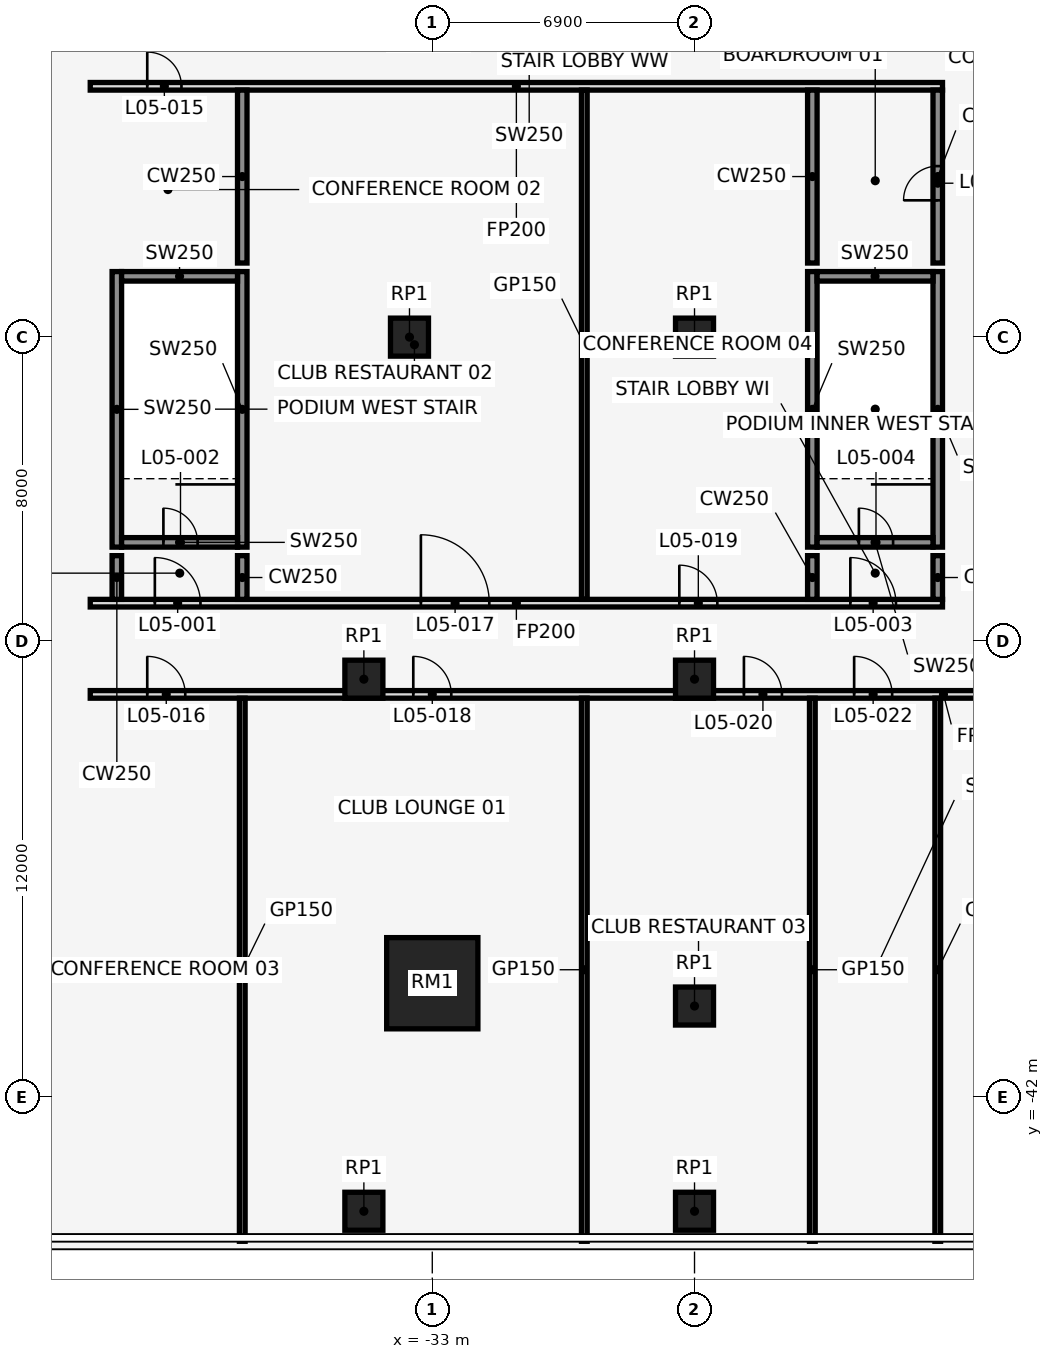
"""IFC4 building model, lengths in metres.
Left out: names, types, materials, properties, quantities, classifications, styles, units other than length and angle.
Written with IfcOpenShell. Run it as: python <this file> out.ifc"""

import sys

from ifc_helpers import new_model, si_unit, direction, frame, frame_2d, origin, origin_2d, place, context, subcontext, project, spatial, rectangle, extrude, element, fill, save


model = new_model("IFC4")
c1 = context("Model", 3, precision=1e-05, world=origin(), true_north=direction((0.0, 1.0)))
c2 = subcontext(c1, "Body", "Model", "MODEL_VIEW")
j1 = project(units=[si_unit("LENGTHUNIT", "METRE"), si_unit("PLANEANGLEUNIT", "RADIAN")], contexts=[c1])
p1 = place(None, origin())
s1 = spatial("IfcSite", under=j1, at=p1, CompositionType="ELEMENT")
p2 = place(p1, origin())
s2 = spatial("IfcBuilding", under=s1, at=p2, CompositionType="ELEMENT")
p3 = place(p2, frame((0.0, 0.0, 30.0)))
s3 = spatial("IfcBuildingStorey", under=s2, at=p3, CompositionType="ELEMENT", Elevation=30.0)
p4 = place(p3, frame((-33.0, -39.0, 0.0), z_axis=(0.0, 0.0, 1.0), x_axis=(1.0, 0.0, 0.0)))
e1 = element("IfcColumn", 1, at=p4, inside=s3, PredefinedType="COLUMN", context=c2, shape_type="SweptSolid", body=[
    extrude(rectangle(XDim=2.4, YDim=2.4, at=origin_2d()), origin(), (0.0, 0.0, 1.0), 5.0),
])
for number, where, z_axis, x_axis in (
    (2, (-26.1, -39.6, 0.0), (0.0, 0.0, 1.0), (1.0, 0.0, 0.0)),
    (3, (-33.6, -22.0, 0.0), (0.0, 0.0, 1.0), (1.0, 0.0, 0.0)),
    (4, (-26.1, -22.0, 0.0), (0.0, 0.0, 1.0), (1.0, 0.0, 0.0)),
    (5, (-34.8, -31.0, 0.0), (0.0, 0.0, 1.0), (1.0, 0.0, 0.0)),
    (6, (-34.8, -45.0, 0.0), (0.0, 0.0, 1.0), (1.0, 0.0, 0.0)),
    (7, (-26.1, -31.0, 0.0), (0.0, 0.0, 1.0), (1.0, 0.0, 0.0)),
    (8, (-26.1, -45.0, 0.0), (0.0, 0.0, 1.0), (1.0, 0.0, 0.0)),
):
    element("IfcColumn", number, at=place(p3, frame(where, z_axis=z_axis, x_axis=x_axis)), inside=s3, PredefinedType="COLUMN", context=c2, shape_type="SweptSolid", body=[
        extrude(rectangle(XDim=1.0, YDim=1.0, at=origin_2d()), origin(), (0.0, 0.0, 1.0), 5.0),
    ])
for number, where, z_axis, x_axis in (
    (9, (-41.3, -27.525, 0.0), (0.0, 0.0, 1.0), (0.0, 1.0, 0.0)),
    (10, (-38.0, -27.525, 0.0), (0.0, 0.0, 1.0), (0.0, 1.0, 0.0)),
):
    element("IfcWall", number, at=place(p3, frame(where, z_axis=z_axis, x_axis=x_axis)), inside=s3, PredefinedType="SHEAR", context=c2, shape_type="SweptSolid", body=[
        extrude(rectangle(XDim=7.25, YDim=0.25, at=frame_2d((3.625, 0.0))), origin(), (0.0, 0.0, 1.0), 5.0),
    ])
p5 = place(p3, frame((-41.175, -27.4, 0.0), z_axis=(0.0, 0.0, 1.0), x_axis=(1.0, 0.0, 0.0)))
e11 = element("IfcWall", 11, at=p5, inside=s3, PredefinedType="SHEAR", context=c2, shape_type="SweptSolid", body=[
    extrude(rectangle(XDim=3.05, YDim=0.25, at=frame_2d((1.525, 0.0))), origin(), (0.0, 0.0, 1.0), 5.0),
])
p6 = place(p5, frame((1.1, 0.0, 0.0)))
e12 = element("IfcOpeningElement", 12, at=p6, cuts=e11, PredefinedType="OPENING", context=c2, shape_type="SweptSolid", body=[
    extrude(rectangle(XDim=0.9, YDim=2.1, at=frame_2d((0.45, 1.05))), frame((0.0, 0.137, 0.0), z_axis=(0.0, -1.0, 0.0), x_axis=(1.0, 0.0, 0.0)), (0.0, 0.0, 1.0), 0.274),
])
p7 = place(p3, frame((-41.175, -20.4, 0.0), z_axis=(0.0, 0.0, 1.0), x_axis=(1.0, 0.0, 0.0)))
e13 = element("IfcWall", 13, at=p7, inside=s3, PredefinedType="SHEAR", context=c2, shape_type="SweptSolid", body=[
    extrude(rectangle(XDim=3.05, YDim=0.25, at=frame_2d((1.525, 0.0))), origin(), (0.0, 0.0, 1.0), 5.0),
])
for number, where, z_axis, x_axis in (
    (14, (-23.0, -27.525, 0.0), (0.0, 0.0, 1.0), (0.0, 1.0, 0.0)),
    (15, (-19.7, -27.525, 0.0), (0.0, 0.0, 1.0), (0.0, 1.0, 0.0)),
):
    element("IfcWall", number, at=place(p3, frame(where, z_axis=z_axis, x_axis=x_axis)), inside=s3, PredefinedType="SHEAR", context=c2, shape_type="SweptSolid", body=[
        extrude(rectangle(XDim=7.25, YDim=0.25, at=frame_2d((3.625, 0.0))), origin(), (0.0, 0.0, 1.0), 5.0),
    ])
p8 = place(p3, frame((-22.875, -27.4, 0.0), z_axis=(0.0, 0.0, 1.0), x_axis=(1.0, 0.0, 0.0)))
e16 = element("IfcWall", 16, at=p8, inside=s3, PredefinedType="SHEAR", context=c2, shape_type="SweptSolid", body=[
    extrude(rectangle(XDim=3.05, YDim=0.25, at=frame_2d((1.525, 0.0))), origin(), (0.0, 0.0, 1.0), 5.0),
])
p9 = place(p8, frame((1.1, 0.0, 0.0)))
e17 = element("IfcOpeningElement", 17, at=p9, cuts=e16, PredefinedType="OPENING", context=c2, shape_type="SweptSolid", body=[
    extrude(rectangle(XDim=0.9, YDim=2.1, at=frame_2d((0.45, 1.05))), frame((0.0, 0.137, 0.0), z_axis=(0.0, -1.0, 0.0), x_axis=(1.0, 0.0, 0.0)), (0.0, 0.0, 1.0), 0.274),
])
p10 = place(p3, frame((-22.875, -20.4, 0.0), z_axis=(0.0, 0.0, 1.0), x_axis=(1.0, 0.0, 0.0)))
e18 = element("IfcWall", 18, at=p10, inside=s3, PredefinedType="SHEAR", context=c2, shape_type="SweptSolid", body=[
    extrude(rectangle(XDim=3.05, YDim=0.25, at=frame_2d((1.525, 0.0))), origin(), (0.0, 0.0, 1.0), 5.0),
])
p11 = place(p3, frame((-42.0, -31.4, 0.0), z_axis=(0.0, 0.0, 1.0), x_axis=(1.0, 0.0, 0.0)))
e19 = element("IfcWall", 19, at=p11, inside=s3, PredefinedType="PARTITIONING", context=c2, shape_type="SweptSolid", body=[
    extrude(rectangle(XDim=44.9, YDim=0.2, at=frame_2d((22.45, 0.0))), origin(), (0.0, 0.0, 1.0), 3.74),
])
p12 = place(p11, frame((1.5, 0.0, 0.0)))
e20 = element("IfcOpeningElement", 20, at=p12, cuts=e19, PredefinedType="OPENING", context=c2, shape_type="SweptSolid", body=[
    extrude(rectangle(XDim=1.0, YDim=2.1, at=frame_2d((0.5, 1.05))), frame((0.0, 0.112, 0.0), z_axis=(0.0, -1.0, 0.0), x_axis=(1.0, 0.0, 0.0)), (0.0, 0.0, 1.0), 0.224),
])
p13 = place(p11, frame((8.5, 0.0, 0.0)))
e21 = element("IfcOpeningElement", 21, at=p13, cuts=e19, PredefinedType="OPENING", context=c2, shape_type="SweptSolid", body=[
    extrude(rectangle(XDim=1.0, YDim=2.1, at=frame_2d((0.5, 1.05))), frame((0.0, 0.112, 0.0), z_axis=(0.0, -1.0, 0.0), x_axis=(1.0, 0.0, 0.0)), (0.0, 0.0, 1.0), 0.224),
])
p14 = place(p11, frame((17.2, 0.0, 0.0)))
e22 = element("IfcOpeningElement", 22, at=p14, cuts=e19, PredefinedType="OPENING", context=c2, shape_type="SweptSolid", body=[
    extrude(rectangle(XDim=1.0, YDim=2.1, at=frame_2d((0.5, 1.05))), frame((0.0, 0.112, 0.0), z_axis=(0.0, -1.0, 0.0), x_axis=(1.0, 0.0, 0.0)), (0.0, 0.0, 1.0), 0.224),
])
p15 = place(p11, frame((20.1, 0.0, 0.0)))
e23 = element("IfcOpeningElement", 23, at=p15, cuts=e19, PredefinedType="OPENING", context=c2, shape_type="SweptSolid", body=[
    extrude(rectangle(XDim=1.0, YDim=2.1, at=frame_2d((0.5, 1.05))), frame((0.0, 0.112, 0.0), z_axis=(0.0, -1.0, 0.0), x_axis=(1.0, 0.0, 0.0)), (0.0, 0.0, 1.0), 0.224),
])
p16 = place(p11, frame((28.9, 0.0, 0.0)))
e24 = element("IfcOpeningElement", 24, at=p16, cuts=e19, PredefinedType="OPENING", context=c2, shape_type="SweptSolid", body=[
    extrude(rectangle(XDim=1.0, YDim=2.1, at=frame_2d((0.5, 1.05))), frame((0.0, 0.112, 0.0), z_axis=(0.0, -1.0, 0.0), x_axis=(1.0, 0.0, 0.0)), (0.0, 0.0, 1.0), 0.224),
])
p17 = place(p11, frame((38.6, 0.0, 0.0)))
e25 = element("IfcOpeningElement", 25, at=p17, cuts=e19, PredefinedType="OPENING", context=c2, shape_type="SweptSolid", body=[
    extrude(rectangle(XDim=1.0, YDim=2.1, at=frame_2d((0.5, 1.05))), frame((0.0, 0.112, 0.0), z_axis=(0.0, -1.0, 0.0), x_axis=(1.0, 0.0, 0.0)), (0.0, 0.0, 1.0), 0.224),
])
p18 = place(p3, frame((-42.0, -29.0, 0.0), z_axis=(0.0, 0.0, 1.0), x_axis=(1.0, 0.0, 0.0)))
e26 = element("IfcWall", 26, at=p18, inside=s3, PredefinedType="PARTITIONING", context=c2, shape_type="SweptSolid", body=[
    extrude(rectangle(XDim=22.425, YDim=0.2, at=frame_2d((11.212, 0.0))), origin(), (0.0, 0.0, 1.0), 3.74),
])
p19 = place(p18, frame((1.7, 0.0, 0.0)))
e27 = element("IfcOpeningElement", 27, at=p19, cuts=e26, PredefinedType="OPENING", context=c2, shape_type="SweptSolid", body=[
    extrude(rectangle(XDim=1.2, YDim=2.1, at=frame_2d((0.6, 1.05))), frame((0.0, 0.112, 0.0), z_axis=(0.0, -1.0, 0.0), x_axis=(1.0, 0.0, 0.0)), (0.0, 0.0, 1.0), 0.224),
])
p20 = place(p18, frame((20.0, 0.0, 0.0)))
e28 = element("IfcOpeningElement", 28, at=p20, cuts=e26, PredefinedType="OPENING", context=c2, shape_type="SweptSolid", body=[
    extrude(rectangle(XDim=1.2, YDim=2.1, at=frame_2d((0.6, 1.05))), frame((0.0, 0.112, 0.0), z_axis=(0.0, -1.0, 0.0), x_axis=(1.0, 0.0, 0.0)), (0.0, 0.0, 1.0), 0.224),
])
p21 = place(p18, frame((8.7, 0.0, 0.0)))
e29 = element("IfcOpeningElement", 29, at=p21, cuts=e26, PredefinedType="OPENING", context=c2, shape_type="SweptSolid", body=[
    extrude(rectangle(XDim=1.8, YDim=2.1, at=frame_2d((0.9, 1.05))), frame((0.0, 0.112, 0.0), z_axis=(0.0, -1.0, 0.0), x_axis=(1.0, 0.0, 0.0)), (0.0, 0.0, 1.0), 0.224),
])
p22 = place(p18, frame((15.5, 0.0, 0.0)))
e30 = element("IfcOpeningElement", 30, at=p22, cuts=e26, PredefinedType="OPENING", context=c2, shape_type="SweptSolid", body=[
    extrude(rectangle(XDim=1.0, YDim=2.1, at=frame_2d((0.5, 1.05))), frame((0.0, 0.112, 0.0), z_axis=(0.0, -1.0, 0.0), x_axis=(1.0, 0.0, 0.0)), (0.0, 0.0, 1.0), 0.224),
])
p23 = place(p3, frame((-42.0, -15.4, 0.0), z_axis=(0.0, 0.0, 1.0), x_axis=(1.0, 0.0, 0.0)))
e31 = element("IfcWall", 31, at=p23, inside=s3, PredefinedType="PARTITIONING", context=c2, shape_type="SweptSolid", body=[
    extrude(rectangle(XDim=22.425, YDim=0.2, at=frame_2d((11.212, 0.0))), origin(), (0.0, 0.0, 1.0), 3.74),
])
p24 = place(p23, frame((1.5, 0.0, 0.0)))
e32 = element("IfcOpeningElement", 32, at=p24, cuts=e31, PredefinedType="OPENING", context=c2, shape_type="SweptSolid", body=[
    extrude(rectangle(XDim=0.9, YDim=2.1, at=frame_2d((0.45, 1.05))), frame((0.0, 0.112, 0.0), z_axis=(0.0, -1.0, 0.0), x_axis=(1.0, 0.0, 0.0)), (0.0, 0.0, 1.0), 0.224),
])
p25 = place(p3, frame((-41.3, -28.9, 0.0), z_axis=(0.0, 0.0, 1.0), x_axis=(0.0, 1.0, 0.0)))
e33 = element("IfcWall", 33, at=p25, inside=s3, PredefinedType="SHEAR", context=c2, shape_type="SweptSolid", body=[
    extrude(rectangle(XDim=1.15, YDim=0.25, at=frame_2d((0.575, 0.0))), origin(), (0.0, 0.0, 1.0), 5.0),
])
p26 = place(p3, frame((-38.0, -45.79, 0.0), z_axis=(0.0, 0.0, 1.0), x_axis=(0.0, 1.0, 0.0)))
e34 = element("IfcWall", 34, at=p26, inside=s3, PredefinedType="PARTITIONING", context=c2, shape_type="SweptSolid", body=[
    extrude(rectangle(XDim=14.29, YDim=0.15, at=frame_2d((7.145, 0.0))), origin(), (0.0, 0.0, 1.0), 3.74),
])
p27 = place(p3, frame((-38.0, -28.9, 0.0), z_axis=(0.0, 0.0, 1.0), x_axis=(0.0, 1.0, 0.0)))
e35 = element("IfcWall", 35, at=p27, inside=s3, PredefinedType="SHEAR", context=c2, shape_type="SweptSolid", body=[
    extrude(rectangle(XDim=1.15, YDim=0.25, at=frame_2d((0.575, 0.0))), origin(), (0.0, 0.0, 1.0), 5.0),
])
p28 = place(p3, frame((-38.0, -20.05, 0.0), z_axis=(0.0, 0.0, 1.0), x_axis=(0.0, 1.0, 0.0)))
e36 = element("IfcWall", 36, at=p28, inside=s3, PredefinedType="SHEAR", context=c2, shape_type="SweptSolid", body=[
    extrude(rectangle(XDim=4.55, YDim=0.25, at=frame_2d((2.275, 0.0))), origin(), (0.0, 0.0, 1.0), 5.0),
])
p29 = place(p3, frame((-29.0, -45.79, 0.0), z_axis=(0.0, 0.0, 1.0), x_axis=(0.0, 1.0, 0.0)))
e37 = element("IfcWall", 37, at=p29, inside=s3, PredefinedType="PARTITIONING", context=c2, shape_type="SweptSolid", body=[
    extrude(rectangle(XDim=14.29, YDim=0.15, at=frame_2d((7.145, 0.0))), origin(), (0.0, 0.0, 1.0), 3.74),
])
p30 = place(p3, frame((-29.0, -28.9, 0.0), z_axis=(0.0, 0.0, 1.0), x_axis=(0.0, 1.0, 0.0)))
e38 = element("IfcWall", 38, at=p30, inside=s3, PredefinedType="PARTITIONING", context=c2, shape_type="SweptSolid", body=[
    extrude(rectangle(XDim=13.4, YDim=0.15, at=frame_2d((6.7, 0.0))), origin(), (0.0, 0.0, 1.0), 3.74),
])
p31 = place(p3, frame((-23.0, -45.79, 0.0), z_axis=(0.0, 0.0, 1.0), x_axis=(0.0, 1.0, 0.0)))
e39 = element("IfcWall", 39, at=p31, inside=s3, PredefinedType="PARTITIONING", context=c2, shape_type="SweptSolid", body=[
    extrude(rectangle(XDim=14.29, YDim=0.15, at=frame_2d((7.145, 0.0))), origin(), (0.0, 0.0, 1.0), 3.74),
])
p32 = place(p3, frame((-23.0, -28.9, 0.0), z_axis=(0.0, 0.0, 1.0), x_axis=(0.0, 1.0, 0.0)))
e40 = element("IfcWall", 40, at=p32, inside=s3, PredefinedType="SHEAR", context=c2, shape_type="SweptSolid", body=[
    extrude(rectangle(XDim=1.15, YDim=0.25, at=frame_2d((0.575, 0.0))), origin(), (0.0, 0.0, 1.0), 5.0),
])
p33 = place(p3, frame((-23.0, -20.05, 0.0), z_axis=(0.0, 0.0, 1.0), x_axis=(0.0, 1.0, 0.0)))
e41 = element("IfcWall", 41, at=p33, inside=s3, PredefinedType="SHEAR", context=c2, shape_type="SweptSolid", body=[
    extrude(rectangle(XDim=4.55, YDim=0.25, at=frame_2d((2.275, 0.0))), origin(), (0.0, 0.0, 1.0), 5.0),
])
p34 = place(p3, frame((-19.7, -45.79, 0.0), z_axis=(0.0, 0.0, 1.0), x_axis=(0.0, 1.0, 0.0)))
e42 = element("IfcWall", 42, at=p34, inside=s3, PredefinedType="PARTITIONING", context=c2, shape_type="SweptSolid", body=[
    extrude(rectangle(XDim=14.29, YDim=0.15, at=frame_2d((7.145, 0.0))), origin(), (0.0, 0.0, 1.0), 3.74),
])
p35 = place(p3, frame((-19.7, -28.9, 0.0), z_axis=(0.0, 0.0, 1.0), x_axis=(0.0, 1.0, 0.0)))
e43 = element("IfcWall", 43, at=p35, inside=s3, PredefinedType="SHEAR", context=c2, shape_type="SweptSolid", body=[
    extrude(rectangle(XDim=1.15, YDim=0.25, at=frame_2d((0.575, 0.0))), origin(), (0.0, 0.0, 1.0), 5.0),
])
p36 = place(p3, frame((-19.7, -20.05, 0.0), z_axis=(0.0, 0.0, 1.0), x_axis=(0.0, 1.0, 0.0)))
e44 = element("IfcWall", 44, at=p36, inside=s3, PredefinedType="SHEAR", context=c2, shape_type="SweptSolid", body=[
    extrude(rectangle(XDim=4.55, YDim=0.25, at=frame_2d((2.275, 0.0))), origin(), (0.0, 0.0, 1.0), 5.0),
])
p37 = place(p36, frame((1.65, 0.0, 0.0)))
e45 = element("IfcOpeningElement", 45, at=p37, cuts=e44, PredefinedType="OPENING", context=c2, shape_type="SweptSolid", body=[
    extrude(rectangle(XDim=0.9, YDim=2.1, at=frame_2d((0.45, 1.05))), frame((0.0, 0.137, 0.0), z_axis=(0.0, -1.0, 0.0), x_axis=(1.0, 0.0, 0.0)), (0.0, 0.0, 1.0), 0.274),
])
p38 = place(p19, origin())
e46 = element("IfcDoor", 46, at=p38, inside=s3, OperationType="SINGLE_SWING_LEFT", PredefinedType="DOOR", context=c2, shape_type="SweptSolid", body=[
    extrude(rectangle(XDim=1.2, YDim=2.1, at=frame_2d((0.6, 1.05))), frame((0.0, 0.025, 0.0), z_axis=(0.0, -1.0, 0.0), x_axis=(1.0, 0.0, 0.0)), (0.0, 0.0, 1.0), 0.05),
])
fill(e27, e46)
p39 = place(p6, origin())
e47 = element("IfcDoor", 47, at=p39, inside=s3, OperationType="SINGLE_SWING_LEFT", PredefinedType="DOOR", context=c2, shape_type="SweptSolid", body=[
    extrude(rectangle(XDim=0.9, YDim=2.1, at=frame_2d((0.45, 1.05))), frame((0.0, 0.025, 0.0), z_axis=(0.0, -1.0, 0.0), x_axis=(1.0, 0.0, 0.0)), (0.0, 0.0, 1.0), 0.05),
])
fill(e12, e47)
p40 = place(p20, origin())
e48 = element("IfcDoor", 48, at=p40, inside=s3, OperationType="SINGLE_SWING_RIGHT", PredefinedType="DOOR", context=c2, shape_type="SweptSolid", body=[
    extrude(rectangle(XDim=1.2, YDim=2.1, at=frame_2d((0.6, 1.05))), frame((0.0, 0.025, 0.0), z_axis=(0.0, -1.0, 0.0), x_axis=(1.0, 0.0, 0.0)), (0.0, 0.0, 1.0), 0.05),
])
fill(e28, e48)
p41 = place(p9, origin())
e49 = element("IfcDoor", 49, at=p41, inside=s3, OperationType="SINGLE_SWING_LEFT", PredefinedType="DOOR", context=c2, shape_type="SweptSolid", body=[
    extrude(rectangle(XDim=0.9, YDim=2.1, at=frame_2d((0.45, 1.05))), frame((0.0, 0.025, 0.0), z_axis=(0.0, -1.0, 0.0), x_axis=(1.0, 0.0, 0.0)), (0.0, 0.0, 1.0), 0.05),
])
fill(e17, e49)
p42 = place(p24, frame((0.9, 0.0, 0.0), z_axis=(0.0, 0.0, 1.0), x_axis=(-1.0, 0.0, 0.0)))
e50 = element("IfcDoor", 50, at=p42, inside=s3, OperationType="SINGLE_SWING_RIGHT", PredefinedType="DOOR", context=c2, shape_type="SweptSolid", body=[
    extrude(rectangle(XDim=0.9, YDim=2.1, at=frame_2d((0.45, 1.05))), frame((0.0, 0.025, 0.0), z_axis=(0.0, -1.0, 0.0), x_axis=(1.0, 0.0, 0.0)), (0.0, 0.0, 1.0), 0.05),
])
fill(e32, e50)
p43 = place(p12, frame((1.0, 0.0, 0.0), z_axis=(0.0, 0.0, 1.0), x_axis=(-1.0, 0.0, 0.0)))
e51 = element("IfcDoor", 51, at=p43, inside=s3, OperationType="SINGLE_SWING_LEFT", PredefinedType="DOOR", context=c2, shape_type="SweptSolid", body=[
    extrude(rectangle(XDim=1.0, YDim=2.1, at=frame_2d((0.5, 1.05))), frame((0.0, 0.025, 0.0), z_axis=(0.0, -1.0, 0.0), x_axis=(1.0, 0.0, 0.0)), (0.0, 0.0, 1.0), 0.05),
])
fill(e20, e51)
p44 = place(p21, origin())
e52 = element("IfcDoor", 52, at=p44, inside=s3, OperationType="SINGLE_SWING_LEFT", PredefinedType="DOOR", context=c2, shape_type="SweptSolid", body=[
    extrude(rectangle(XDim=1.8, YDim=2.1, at=frame_2d((0.9, 1.05))), frame((0.0, 0.025, 0.0), z_axis=(0.0, -1.0, 0.0), x_axis=(1.0, 0.0, 0.0)), (0.0, 0.0, 1.0), 0.05),
])
fill(e29, e52)
p45 = place(p13, frame((1.0, 0.0, 0.0), z_axis=(0.0, 0.0, 1.0), x_axis=(-1.0, 0.0, 0.0)))
e53 = element("IfcDoor", 53, at=p45, inside=s3, OperationType="SINGLE_SWING_RIGHT", PredefinedType="DOOR", context=c2, shape_type="SweptSolid", body=[
    extrude(rectangle(XDim=1.0, YDim=2.1, at=frame_2d((0.5, 1.05))), frame((0.0, 0.025, 0.0), z_axis=(0.0, -1.0, 0.0), x_axis=(1.0, 0.0, 0.0)), (0.0, 0.0, 1.0), 0.05),
])
fill(e21, e53)
p46 = place(p22, origin())
e54 = element("IfcDoor", 54, at=p46, inside=s3, OperationType="SINGLE_SWING_LEFT", PredefinedType="DOOR", context=c2, shape_type="SweptSolid", body=[
    extrude(rectangle(XDim=1.0, YDim=2.1, at=frame_2d((0.5, 1.05))), frame((0.0, 0.025, 0.0), z_axis=(0.0, -1.0, 0.0), x_axis=(1.0, 0.0, 0.0)), (0.0, 0.0, 1.0), 0.05),
])
fill(e30, e54)
p47 = place(p14, frame((1.0, 0.0, 0.0), z_axis=(0.0, 0.0, 1.0), x_axis=(-1.0, 0.0, 0.0)))
e55 = element("IfcDoor", 55, at=p47, inside=s3, OperationType="SINGLE_SWING_RIGHT", PredefinedType="DOOR", context=c2, shape_type="SweptSolid", body=[
    extrude(rectangle(XDim=1.0, YDim=2.1, at=frame_2d((0.5, 1.05))), frame((0.0, 0.025, 0.0), z_axis=(0.0, -1.0, 0.0), x_axis=(1.0, 0.0, 0.0)), (0.0, 0.0, 1.0), 0.05),
])
fill(e22, e55)
p48 = place(p37, origin())
e56 = element("IfcDoor", 56, at=p48, inside=s3, OperationType="SINGLE_SWING_RIGHT", PredefinedType="DOOR", context=c2, shape_type="SweptSolid", body=[
    extrude(rectangle(XDim=0.9, YDim=2.1, at=frame_2d((0.45, 1.05))), frame((0.0, 0.025, 0.0), z_axis=(0.0, -1.0, 0.0), x_axis=(1.0, 0.0, 0.0)), (0.0, 0.0, 1.0), 0.05),
])
fill(e45, e56)
p49 = place(p15, frame((1.0, 0.0, 0.0), z_axis=(0.0, 0.0, 1.0), x_axis=(-1.0, 0.0, 0.0)))
e57 = element("IfcDoor", 57, at=p49, inside=s3, OperationType="SINGLE_SWING_LEFT", PredefinedType="DOOR", context=c2, shape_type="SweptSolid", body=[
    extrude(rectangle(XDim=1.0, YDim=2.1, at=frame_2d((0.5, 1.05))), frame((0.0, 0.025, 0.0), z_axis=(0.0, -1.0, 0.0), x_axis=(1.0, 0.0, 0.0)), (0.0, 0.0, 1.0), 0.05),
])
fill(e23, e57)
save(model, sys.argv[1])
